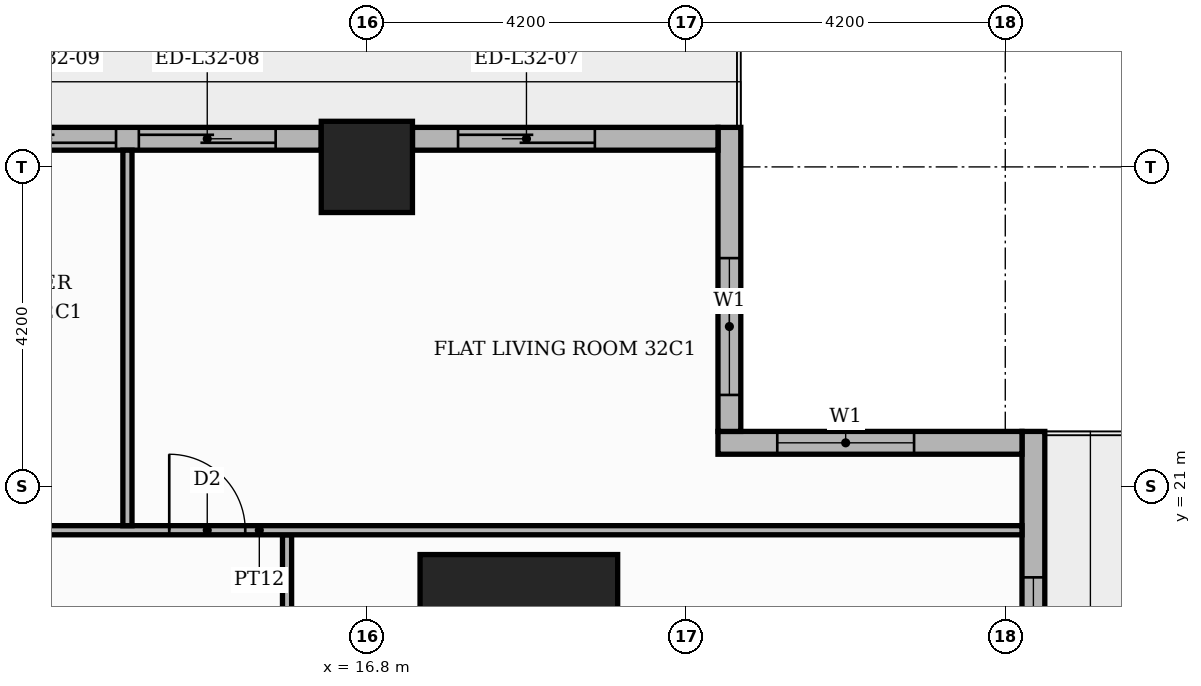
"""IFC4 building model, lengths in metres.
Left out: names, types, materials, properties, quantities, classifications, styles, units other than length and angle.
Written with IfcOpenShell. Run it as: python <this file> out.ifc"""

import sys

from ifc_helpers import new_model, si_unit, direction, frame, frame_2d, origin, origin_2d, place, context, subcontext, project, spatial, rectangle, extrude, element, fill, save


model = new_model("IFC4")
c1 = context("Model", 3, precision=1e-05, world=origin(), true_north=direction((0.0, 1.0)))
c2 = subcontext(c1, "Body", "Model", "MODEL_VIEW")
j1 = project(units=[si_unit("LENGTHUNIT", "METRE"), si_unit("PLANEANGLEUNIT", "RADIAN")], contexts=[c1])
p1 = place(None, origin())
s1 = spatial("IfcSite", under=j1, at=p1, CompositionType="ELEMENT")
p2 = place(p1, origin())
s2 = spatial("IfcBuilding", under=s1, at=p2, CompositionType="ELEMENT")
p3 = place(p2, frame((0.0, 0.0, 137.7)))
s3 = spatial("IfcBuildingStorey", under=s2, at=p3, CompositionType="ELEMENT", Elevation=137.7)
p4 = place(p3, frame((18.8, 18.8, 0.0), z_axis=(0.0, 0.0, 1.0), x_axis=(1.0, 0.0, 0.0)))
e1 = element("IfcColumn", 1, at=p4, inside=s3, PredefinedType="COLUMN", context=c2, shape_type="SweptSolid", body=[
    extrude(rectangle(XDim=2.6, YDim=2.6, at=origin_2d()), origin(), (0.0, 0.0, 1.0), 3.9),
])
p5 = place(p3, frame((16.8, 25.2, 0.0), z_axis=(0.0, 0.0, 1.0), x_axis=(1.0, 0.0, 0.0)))
e2 = element("IfcColumn", 2, at=p5, inside=s3, PredefinedType="COLUMN", context=c2, shape_type="SweptSolid", body=[
    extrude(rectangle(XDim=1.2, YDim=1.2, at=origin_2d()), origin(), (0.0, 0.0, 1.0), 3.9),
])
p6 = place(p3, frame((25.57, 17.4, 0.0), z_axis=(0.0, 0.0, 1.0), x_axis=(0.0, 1.0, 0.0)))
e3 = element("IfcWall", 3, at=p6, inside=s3, PredefinedType="STANDARD", context=c2, shape_type="SweptSolid", body=[
    extrude(rectangle(XDim=4.32, YDim=0.3, at=frame_2d((2.16, 0.0))), origin(), (0.0, 0.0, 1.0), 3.48),
])
p7 = place(p6, frame((0.6, 0.0, 0.9)))
e4 = element("IfcOpeningElement", 4, at=p7, cuts=e3, PredefinedType="OPENING", context=c2, shape_type="SweptSolid", body=[
    extrude(rectangle(XDim=1.8, YDim=2.1, at=frame_2d((0.9, 1.05))), frame((0.0, 0.16, 0.0), z_axis=(0.0, -1.0, 0.0), x_axis=(1.0, 0.0, 0.0)), (0.0, 0.0, 1.0), 0.32),
])
p8 = place(p3, frame((25.42, 21.57, 0.0), z_axis=(0.0, 0.0, 1.0), x_axis=(-1.0, 0.0, 0.0)))
e5 = element("IfcWall", 5, at=p8, inside=s3, PredefinedType="STANDARD", context=c2, shape_type="SweptSolid", body=[
    extrude(rectangle(XDim=4.0, YDim=0.3, at=frame_2d((2.0, 0.0))), origin(), (0.0, 0.0, 1.0), 3.48),
])
p9 = place(p8, frame((1.42, 0.0, 0.9)))
e6 = element("IfcOpeningElement", 6, at=p9, cuts=e5, PredefinedType="OPENING", context=c2, shape_type="SweptSolid", body=[
    extrude(rectangle(XDim=1.8, YDim=2.1, at=frame_2d((0.9, 1.05))), frame((0.0, 0.16, 0.0), z_axis=(0.0, -1.0, 0.0), x_axis=(1.0, 0.0, 0.0)), (0.0, 0.0, 1.0), 0.32),
])
p10 = place(p3, frame((21.57, 21.72, 0.0), z_axis=(0.0, 0.0, 1.0), x_axis=(0.0, 1.0, 0.0)))
e7 = element("IfcWall", 7, at=p10, inside=s3, PredefinedType="STANDARD", context=c2, shape_type="SweptSolid", body=[
    extrude(rectangle(XDim=4.0, YDim=0.3, at=frame_2d((2.0, 0.0))), origin(), (0.0, 0.0, 1.0), 3.48),
])
p11 = place(p10, frame((0.48, 0.0, 0.9)))
e8 = element("IfcOpeningElement", 8, at=p11, cuts=e7, PredefinedType="OPENING", context=c2, shape_type="SweptSolid", body=[
    extrude(rectangle(XDim=1.8, YDim=2.1, at=frame_2d((0.9, 1.05))), frame((0.0, 0.16, 0.0), z_axis=(0.0, -1.0, 0.0), x_axis=(1.0, 0.0, 0.0)), (0.0, 0.0, 1.0), 0.32),
])
p12 = place(p3, frame((21.42, 25.57, 0.0), z_axis=(0.0, 0.0, 1.0), x_axis=(-1.0, 0.0, 0.0)))
e9 = element("IfcWall", 9, at=p12, inside=s3, PredefinedType="STANDARD", context=c2, shape_type="SweptSolid", body=[
    extrude(rectangle(XDim=4.02, YDim=0.3, at=frame_2d((2.01, 0.0))), origin(), (0.0, 0.0, 1.0), 3.48),
])
p13 = place(p12, frame((1.62, 0.0, 0.0)))
e10 = element("IfcOpeningElement", 10, at=p13, cuts=e9, PredefinedType="OPENING", context=c2, shape_type="SweptSolid", body=[
    extrude(rectangle(XDim=1.8, YDim=2.4, at=frame_2d((0.9, 1.2))), frame((0.0, 0.16, 0.0), z_axis=(0.0, -1.0, 0.0), x_axis=(1.0, 0.0, 0.0)), (0.0, 0.0, 1.0), 0.32),
])
p14 = place(p3, frame((16.2, 25.57, 0.0), z_axis=(0.0, 0.0, 1.0), x_axis=(-1.0, 0.0, 0.0)))
e11 = element("IfcWall", 11, at=p14, inside=s3, PredefinedType="STANDARD", context=c2, shape_type="SweptSolid", body=[
    extrude(rectangle(XDim=7.2, YDim=0.3, at=frame_2d((3.6, 0.0))), origin(), (0.0, 0.0, 1.0), 3.48),
])
p15 = place(p14, frame((0.6, 0.0, 0.0)))
e12 = element("IfcOpeningElement", 12, at=p15, cuts=e11, PredefinedType="OPENING", context=c2, shape_type="SweptSolid", body=[
    extrude(rectangle(XDim=1.8, YDim=2.4, at=frame_2d((0.9, 1.2))), frame((0.0, 0.16, 0.0), z_axis=(0.0, -1.0, 0.0), x_axis=(1.0, 0.0, 0.0)), (0.0, 0.0, 1.0), 0.32),
])
p16 = place(p14, frame((2.7, 0.0, 0.0)))
e13 = element("IfcOpeningElement", 13, at=p16, cuts=e11, PredefinedType="OPENING", context=c2, shape_type="SweptSolid", body=[
    extrude(rectangle(XDim=1.8, YDim=2.4, at=frame_2d((0.9, 1.2))), frame((0.0, 0.16, 0.0), z_axis=(0.0, -1.0, 0.0), x_axis=(1.0, 0.0, 0.0)), (0.0, 0.0, 1.0), 0.32),
])
p17 = place(p14, frame((4.8, 0.0, 0.9)))
e14 = element("IfcOpeningElement", 14, at=p17, cuts=e11, PredefinedType="OPENING", context=c2, shape_type="SweptSolid", body=[
    extrude(rectangle(XDim=1.8, YDim=2.1, at=frame_2d((0.9, 1.05))), frame((0.0, 0.16, 0.0), z_axis=(0.0, -1.0, 0.0), x_axis=(1.0, 0.0, 0.0)), (0.0, 0.0, 1.0), 0.32),
])
p18 = place(p3, frame((15.75, 13.75, 0.0), z_axis=(0.0, 0.0, 1.0), x_axis=(0.0, 1.0, 0.0)))
e15 = element("IfcWall", 15, at=p18, inside=s3, PredefinedType="PARTITIONING", context=c2, shape_type="SweptSolid", body=[
    extrude(rectangle(XDim=6.61, YDim=0.12, at=frame_2d((3.305, 0.0))), origin(), (0.0, 0.0, 1.0), 3.48),
])
p19 = place(p18, frame((2.785, 0.0, 0.0)))
e16 = element("IfcOpeningElement", 16, at=p19, cuts=e15, PredefinedType="OPENING", context=c2, shape_type="SweptSolid", body=[
    extrude(rectangle(XDim=1.0, YDim=2.1, at=frame_2d((0.5, 1.05))), frame((0.0, 0.07, 0.0), z_axis=(0.0, -1.0, 0.0), x_axis=(1.0, 0.0, 0.0)), (0.0, 0.0, 1.0), 0.14),
])
p20 = place(p3, frame((5.35, 20.42, 0.0), z_axis=(0.0, 0.0, 1.0), x_axis=(1.0, 0.0, 0.0)))
e17 = element("IfcWall", 17, at=p20, inside=s3, PredefinedType="PARTITIONING", context=c2, shape_type="SweptSolid", body=[
    extrude(rectangle(XDim=20.07, YDim=0.12, at=frame_2d((10.035, 0.0))), origin(), (0.0, 0.0, 1.0), 3.48),
])
p21 = place(p20, frame((8.85, 0.0, 0.0)))
e18 = element("IfcOpeningElement", 18, at=p21, cuts=e17, PredefinedType="OPENING", context=c2, shape_type="SweptSolid", body=[
    extrude(rectangle(XDim=1.0, YDim=2.1, at=frame_2d((0.5, 1.05))), frame((0.0, 0.07, 0.0), z_axis=(0.0, -1.0, 0.0), x_axis=(1.0, 0.0, 0.0)), (0.0, 0.0, 1.0), 0.14),
])
p22 = place(p20, frame((5.75, 0.0, 0.0)))
e19 = element("IfcOpeningElement", 19, at=p22, cuts=e17, PredefinedType="OPENING", context=c2, shape_type="SweptSolid", body=[
    extrude(rectangle(XDim=0.9, YDim=2.1, at=frame_2d((0.45, 1.05))), frame((0.0, 0.07, 0.0), z_axis=(0.0, -1.0, 0.0), x_axis=(1.0, 0.0, 0.0)), (0.0, 0.0, 1.0), 0.14),
])
p23 = place(p3, frame((13.65, 20.48, 0.0), z_axis=(0.0, 0.0, 1.0), x_axis=(0.0, 1.0, 0.0)))
e20 = element("IfcWall", 20, at=p23, inside=s3, PredefinedType="PARTITIONING", context=c2, shape_type="SweptSolid", body=[
    extrude(rectangle(XDim=4.94, YDim=0.12, at=frame_2d((2.47, 0.0))), origin(), (0.0, 0.0, 1.0), 3.48),
])
p24 = place(p7, origin())
e21 = element("IfcWindow", 21, at=p24, inside=s3, PartitioningType="SINGLE_PANEL", PredefinedType="WINDOW", context=c2, shape_type="SweptSolid", body=[
    extrude(rectangle(XDim=1.8, YDim=2.1, at=frame_2d((0.9, 1.05))), frame((0.0, 0.03, 0.0), z_axis=(0.0, -1.0, 0.0), x_axis=(1.0, 0.0, 0.0)), (0.0, 0.0, 1.0), 0.06),
])
fill(e4, e21)
p25 = place(p9, origin())
e22 = element("IfcWindow", 22, at=p25, inside=s3, PartitioningType="SINGLE_PANEL", PredefinedType="WINDOW", context=c2, shape_type="SweptSolid", body=[
    extrude(rectangle(XDim=1.8, YDim=2.1, at=frame_2d((0.9, 1.05))), frame((0.0, 0.03, 0.0), z_axis=(0.0, -1.0, 0.0), x_axis=(1.0, 0.0, 0.0)), (0.0, 0.0, 1.0), 0.06),
])
fill(e6, e22)
p26 = place(p11, origin())
e23 = element("IfcWindow", 23, at=p26, inside=s3, PartitioningType="SINGLE_PANEL", PredefinedType="WINDOW", context=c2, shape_type="SweptSolid", body=[
    extrude(rectangle(XDim=1.8, YDim=2.1, at=frame_2d((0.9, 1.05))), frame((0.0, 0.03, 0.0), z_axis=(0.0, -1.0, 0.0), x_axis=(1.0, 0.0, 0.0)), (0.0, 0.0, 1.0), 0.06),
])
fill(e8, e23)
p27 = place(p13, origin())
e24 = element("IfcDoor", 24, at=p27, inside=s3, OperationType="SLIDING_TO_RIGHT", PredefinedType="DOOR", context=c2, shape_type="SweptSolid", body=[
    extrude(rectangle(XDim=1.8, YDim=2.4, at=frame_2d((0.9, 1.2))), frame((0.0, 0.025, 0.0), z_axis=(0.0, -1.0, 0.0), x_axis=(1.0, 0.0, 0.0)), (0.0, 0.0, 1.0), 0.05),
])
fill(e10, e24)
p28 = place(p15, origin())
e25 = element("IfcDoor", 25, at=p28, inside=s3, OperationType="SLIDING_TO_LEFT", PredefinedType="DOOR", context=c2, shape_type="SweptSolid", body=[
    extrude(rectangle(XDim=1.8, YDim=2.4, at=frame_2d((0.9, 1.2))), frame((0.0, 0.025, 0.0), z_axis=(0.0, -1.0, 0.0), x_axis=(1.0, 0.0, 0.0)), (0.0, 0.0, 1.0), 0.05),
])
fill(e12, e25)
p29 = place(p16, origin())
e26 = element("IfcDoor", 26, at=p29, inside=s3, OperationType="SLIDING_TO_RIGHT", PredefinedType="DOOR", context=c2, shape_type="SweptSolid", body=[
    extrude(rectangle(XDim=1.8, YDim=2.4, at=frame_2d((0.9, 1.2))), frame((0.0, 0.025, 0.0), z_axis=(0.0, -1.0, 0.0), x_axis=(1.0, 0.0, 0.0)), (0.0, 0.0, 1.0), 0.05),
])
fill(e13, e26)
p30 = place(p21, origin())
e27 = element("IfcDoor", 27, at=p30, inside=s3, OperationType="SINGLE_SWING_LEFT", PredefinedType="DOOR", context=c2, shape_type="SweptSolid", body=[
    extrude(rectangle(XDim=1.0, YDim=2.1, at=frame_2d((0.5, 1.05))), frame((0.0, 0.025, 0.0), z_axis=(0.0, -1.0, 0.0), x_axis=(1.0, 0.0, 0.0)), (0.0, 0.0, 1.0), 0.05),
])
fill(e18, e27)
save(model, sys.argv[1])
